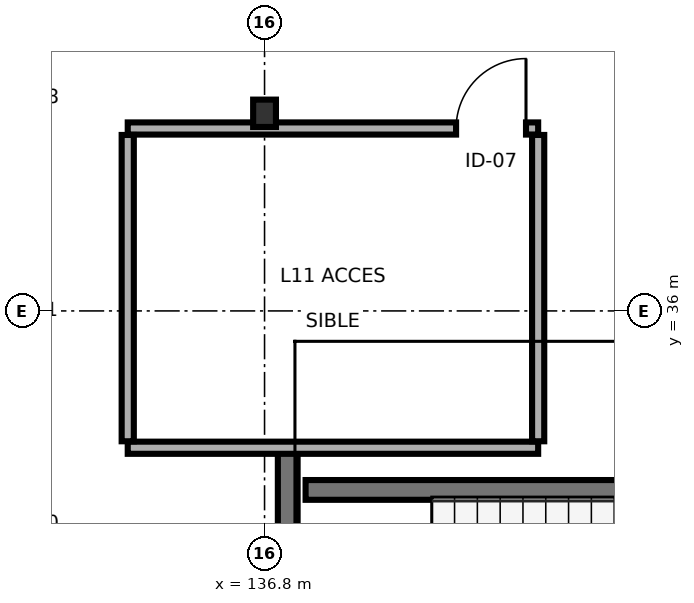
"""IFC4 building model, lengths in metres.
Left out: names, types, materials, properties, quantities, classifications, styles, units other than length and angle.
Written with IfcOpenShell. Run it as: python <this file> out.ifc"""

import sys

from ifc_helpers import new_model, si_unit, direction, frame, frame_2d, origin, origin_2d, place, context, subcontext, project, spatial, rectangle, i_section, extrude, element, fill, save


model = new_model("IFC4")
c1 = context("Model", 3, precision=1e-05, world=origin(), true_north=direction((0.0, 1.0)))
c2 = subcontext(c1, "Body", "Model", "MODEL_VIEW")
j1 = project(units=[si_unit("LENGTHUNIT", "METRE"), si_unit("PLANEANGLEUNIT", "RADIAN")], contexts=[c1])
p1 = place(None, origin())
s1 = spatial("IfcSite", under=j1, at=p1, CompositionType="ELEMENT")
p2 = place(p1, origin())
s2 = spatial("IfcBuilding", under=s1, at=p2, CompositionType="ELEMENT")
p3 = place(p2, frame((0.0, 0.0, 38.5)))
s3 = spatial("IfcBuildingStorey", under=s2, at=p3, CompositionType="ELEMENT", Elevation=38.5)
p4 = place(p3, frame((136.8, 38.6, 0.0), z_axis=(0.0, 0.0, 1.0), x_axis=(1.0, 0.0, 0.0)))
e1 = element("IfcColumn", 1, at=p4, inside=s3, PredefinedType="COLUMN", context=c2, shape_type="SweptSolid", body=[
    extrude(i_section(OverallWidth=0.3, OverallDepth=0.36, WebThickness=0.012, FlangeThickness=0.022, FilletRadius=0.027, at=origin_2d()), origin(), (0.0, 0.0, 1.0), 3.4),
])
p5 = place(p3, frame((137.105, 29.54, 0.0), z_axis=(0.0, 0.0, 1.0), x_axis=(0.0, 1.0, 0.0)))
e2 = element("IfcWall", 2, at=p5, inside=s3, PredefinedType="SHEAR", context=c2, shape_type="SweptSolid", body=[
    extrude(rectangle(XDim=4.635, YDim=0.26, at=frame_2d((2.317, 0.0))), origin(), (0.0, 0.0, 1.0), 3.15),
])
p6 = place(p5, frame((0.61, 0.0, 0.0)))
e3 = element("IfcOpeningElement", 3, at=p6, cuts=e2, PredefinedType="OPENING", context=c2, shape_type="SweptSolid", body=[
    extrude(rectangle(XDim=1.1, YDim=2.2, at=frame_2d((0.55, 1.1))), frame((0.0, 0.14, 0.0), z_axis=(0.0, -1.0, 0.0), x_axis=(1.0, 0.0, 0.0)), (0.0, 0.0, 1.0), 0.28),
])
p7 = place(p3, frame((137.34, 33.645, 0.0), z_axis=(0.0, 0.0, 1.0), x_axis=(1.0, 0.0, 0.0)))
e4 = element("IfcWall", 4, at=p7, inside=s3, PredefinedType="SHEAR", context=c2, shape_type="SweptSolid", body=[
    extrude(rectangle(XDim=8.52, YDim=0.26, at=frame_2d((4.26, 0.0))), origin(), (0.0, 0.0, 1.0), 3.15),
])
p8 = place(p3, frame((135.0, 34.2, 0.0), z_axis=(0.0, 0.0, 1.0), x_axis=(1.0, 0.0, 0.0)))
e5 = element("IfcWall", 5, at=p8, inside=s3, PredefinedType="PARTITIONING", context=c2, shape_type="SweptSolid", body=[
    extrude(rectangle(XDim=5.4, YDim=0.16, at=frame_2d((2.7, 0.0))), origin(), (0.0, 0.0, 1.0), 2.685),
])
p9 = place(p3, frame((135.0, 38.4, 0.0), z_axis=(0.0, 0.0, 1.0), x_axis=(1.0, 0.0, 0.0)))
e6 = element("IfcWall", 6, at=p9, inside=s3, PredefinedType="PARTITIONING", context=c2, shape_type="SweptSolid", body=[
    extrude(rectangle(XDim=5.4, YDim=0.16, at=frame_2d((2.7, 0.0))), origin(), (0.0, 0.0, 1.0), 2.685),
])
p10 = place(p9, frame((4.32, 0.0, 0.0)))
e7 = element("IfcOpeningElement", 7, at=p10, cuts=e6, PredefinedType="OPENING", context=c2, shape_type="SweptSolid", body=[
    extrude(rectangle(XDim=0.92, YDim=2.1, at=frame_2d((0.46, 1.05))), frame((0.0, 0.09, 0.0), z_axis=(0.0, -1.0, 0.0), x_axis=(1.0, 0.0, 0.0)), (0.0, 0.0, 1.0), 0.18),
])
p11 = place(p3, frame((135.0, 34.285, 0.0), z_axis=(0.0, 0.0, 1.0), x_axis=(0.0, 1.0, 0.0)))
e8 = element("IfcWall", 8, at=p11, inside=s3, PredefinedType="PARTITIONING", context=c2, shape_type="SweptSolid", body=[
    extrude(rectangle(XDim=4.03, YDim=0.16, at=frame_2d((2.015, 0.0))), origin(), (0.0, 0.0, 1.0), 2.735),
])
p12 = place(p3, frame((140.4, 34.285, 0.0), z_axis=(0.0, 0.0, 1.0), x_axis=(0.0, 1.0, 0.0)))
e9 = element("IfcWall", 9, at=p12, inside=s3, PredefinedType="PARTITIONING", context=c2, shape_type="SweptSolid", body=[
    extrude(rectangle(XDim=4.03, YDim=0.16, at=frame_2d((2.015, 0.0))), origin(), (0.0, 0.0, 1.0), 3.15),
])
p13 = place(p10, origin())
e10 = element("IfcDoor", 10, at=p13, inside=s3, OperationType="SINGLE_SWING_RIGHT", PredefinedType="DOOR", context=c2, shape_type="SweptSolid", body=[
    extrude(rectangle(XDim=0.92, YDim=2.1, at=frame_2d((0.46, 1.05))), frame((0.0, 0.025, 0.0), z_axis=(0.0, -1.0, 0.0), x_axis=(1.0, 0.0, 0.0)), (0.0, 0.0, 1.0), 0.05),
])
fill(e7, e10)
save(model, sys.argv[1])
